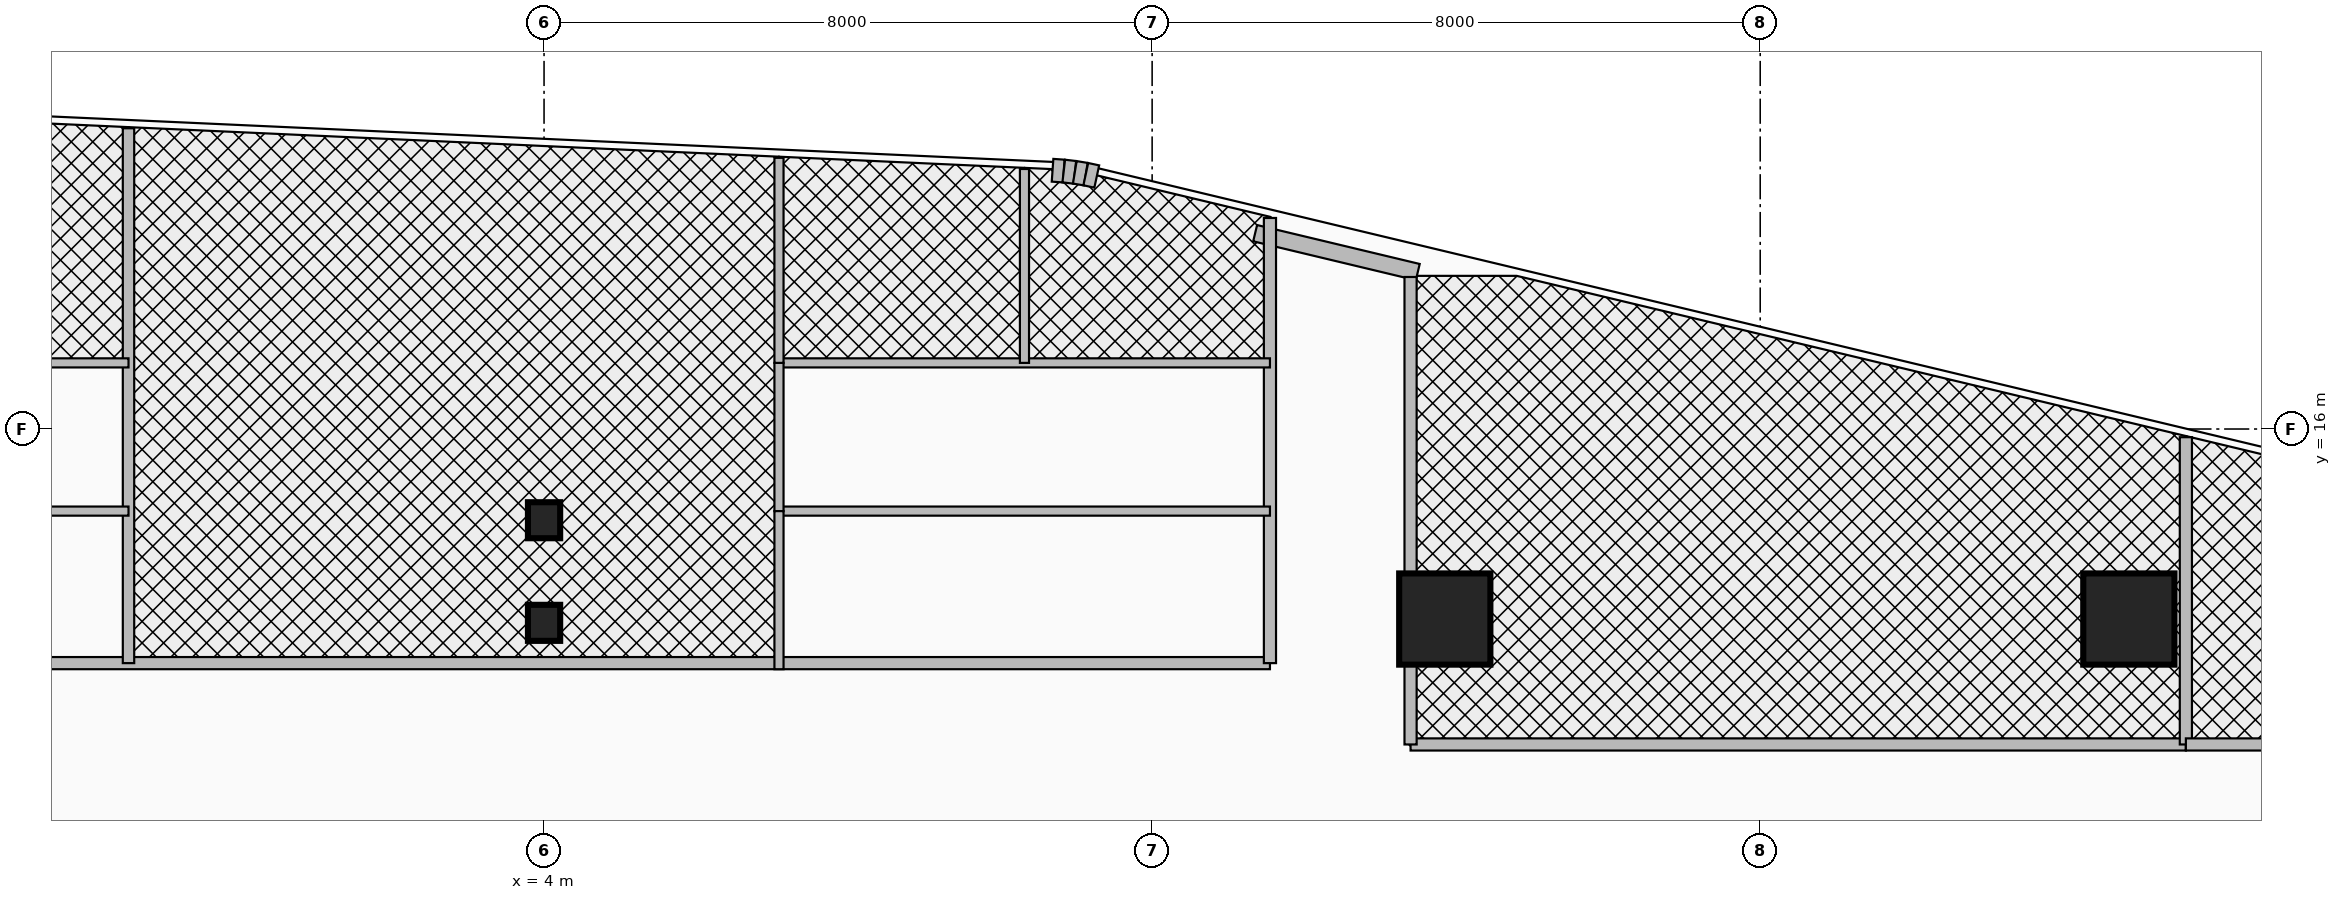
"""IFC4 building model, lengths in metres.
Left out: names, types, materials, properties, quantities, classifications, styles, units other than length and angle.
Written with IfcOpenShell. Run it as: python <this file> out.ifc"""

import sys

from ifc_helpers import new_model, si_unit, direction, frame, frame_2d, origin, origin_2d, place, context, subcontext, project, spatial, rectangle, i_section, extrude, source, transform, mapped, element, fill, save


model = new_model("IFC4")
c1 = context("Model", 3, precision=1e-05, world=origin(), true_north=direction((0.0, 1.0)))
c2 = subcontext(c1, "Body", "Model", "MODEL_VIEW")
j1 = project(units=[si_unit("LENGTHUNIT", "METRE"), si_unit("PLANEANGLEUNIT", "RADIAN")], contexts=[c1])
p1 = place(None, origin())
s1 = spatial("IfcSite", under=j1, at=p1, CompositionType="ELEMENT")
p2 = place(p1, origin())
s2 = spatial("IfcBuilding", under=s1, at=p2, CompositionType="ELEMENT")
p3 = place(p2, frame((0.0, 0.0, 109.4)))
s3 = spatial("IfcBuildingStorey", under=s2, at=p3, CompositionType="ELEMENT", Elevation=109.4)
m1 = source(origin(), c2, "Body", "SweptSolid", [
    extrude(rectangle(XDim=1.2, YDim=1.2, at=origin_2d()), origin(), (0.0, 0.0, 1.0), 3.7),
])
for number, where, z_axis, x_axis in (
    (1, (15.85, 13.5, 0.0), (0.0, 0.0, 1.0), (1.0, 0.0, 0.0)),
    (2, (24.85, 13.5, 0.0), (0.0, 0.0, 1.0), (1.0, 0.0, 0.0)),
):
    element("IfcColumn", number, at=place(p3, frame(where, z_axis=z_axis, x_axis=x_axis)), inside=s3, PredefinedType="COLUMN", context=c2, shape_type="MappedRepresentation", body=[
        mapped(m1, transform((0.0, 0.0, 0.0), x_axis=(1.0, 0.0, 0.0), y_axis=(0.0, 1.0, 0.0), z_axis=(0.0, 0.0, 1.0), scale=1.0)),
    ])
m2 = source(origin(), c2, "Body", "SweptSolid", [
    extrude(i_section(OverallWidth=0.424, OverallDepth=0.474, WebThickness=0.048, FlangeThickness=0.077, at=origin_2d()), origin(), (0.0, 0.0, 1.0), 3.7),
])
for number, where, z_axis, x_axis in (
    (3, (4.0, 13.45, 0.0), (0.0, 0.0, 1.0), (1.0, 0.0, 0.0)),
    (4, (4.0, 14.8, 0.0), (0.0, 0.0, 1.0), (1.0, 0.0, 0.0)),
):
    element("IfcColumn", number, at=place(p3, frame(where, z_axis=z_axis, x_axis=x_axis)), inside=s3, PredefinedType="COLUMN", context=c2, shape_type="MappedRepresentation", body=[
        mapped(m2, transform((0.0, 0.0, 0.0), x_axis=(1.0, 0.0, 0.0), y_axis=(0.0, 1.0, 0.0), z_axis=(0.0, 0.0, 1.0), scale=1.0)),
    ])
p4 = place(p3, frame((10.69, 19.404, 0.0), z_axis=(0.0, 0.0, 1.0), x_axis=(0.99758310784, -0.069483400546, 0.0)))
e5 = element("IfcWall", 5, at=p4, inside=s3, PredefinedType="SOLIDWALL", context=c2, shape_type="SweptSolid", body=[
    extrude(rectangle(XDim=0.147, YDim=0.3, at=frame_2d((0.074, 0.0))), origin(), (0.0, 0.0, 1.0), 3.46),
])
for number, where, z_axis, x_axis in (
    (6, (10.837, 19.394, 0.0), (0.0, 0.0, 1.0), (0.993, -0.117, 0.0)),
    (7, (10.983, 19.377, 0.0), (0.0, 0.0, 1.0), (0.987, -0.163, 0.0)),
):
    element("IfcWall", number, at=place(p3, frame(where, z_axis=z_axis, x_axis=x_axis)), inside=s3, PredefinedType="SOLIDWALL", context=c2, shape_type="SweptSolid", body=[
        extrude(rectangle(XDim=0.146, YDim=0.3, at=frame_2d((0.073, 0.0))), origin(), (0.0, 0.0, 1.0), 3.46),
    ])
p5 = place(p3, frame((11.127, 19.353, 0.0), z_axis=(0.0, 0.0, 1.0), x_axis=(0.978019841688, -0.208511844421, 0.0)))
e8 = element("IfcWall", 8, at=p5, inside=s3, PredefinedType="SOLIDWALL", context=c2, shape_type="SweptSolid", body=[
    extrude(rectangle(XDim=0.147, YDim=0.3, at=frame_2d((0.074, 0.0))), origin(), (0.0, 0.0, 1.0), 3.46),
])
p6 = place(p3, frame((13.355, 18.576, 0.0), z_axis=(0.0, 0.0, 1.0), x_axis=(0.97252211384, -0.232810519721, 0.0)))
e9 = element("IfcWall", 9, at=p6, inside=s3, PredefinedType="SOLIDWALL", context=c2, shape_type="SweptSolid", body=[
    extrude(rectangle(XDim=2.2, YDim=0.22, at=frame_2d((1.1, 0.0))), origin(), (0.0, 0.0, 1.0), 3.46),
])
p7 = place(p6, frame((0.65, 0.0, 0.95)))
e10 = element("IfcOpeningElement", 10, at=p7, cuts=e9, PredefinedType="OPENING", context=c2, shape_type="SweptSolid", body=[
    extrude(rectangle(XDim=0.9, YDim=1.3, at=frame_2d((0.45, 0.65))), frame((0.0, 0.125, 0.0), z_axis=(0.0, -1.0, 0.0), x_axis=(1.0, 0.0, 0.0)), (0.0, 0.0, 1.0), 0.25),
])
p8 = place(p3, frame((-28.25, 12.92, 0.0), z_axis=(0.0, 0.0, 1.0), x_axis=(1.0, 0.0, 0.0)))
e11 = element("IfcWall", 11, at=p8, inside=s3, PredefinedType="PARTITIONING", context=c2, shape_type="SweptSolid", body=[
    extrude(rectangle(XDim=41.8, YDim=0.16, at=frame_2d((20.9, 0.0))), origin(), (0.0, 0.0, 1.0), 2.666),
])
p9 = place(p8, frame((1.456, 0.0, 0.0)))
e12 = element("IfcOpeningElement", 12, at=p9, cuts=e11, PredefinedType="OPENING", context=c2, shape_type="SweptSolid", body=[
    extrude(rectangle(XDim=0.95, YDim=2.15, at=frame_2d((0.475, 1.075))), frame((0.0, 0.095, 0.0), z_axis=(0.0, -1.0, 0.0), x_axis=(1.0, 0.0, 0.0)), (0.0, 0.0, 1.0), 0.19),
])
p10 = place(p8, frame((14.167, 0.0, 0.0)))
e13 = element("IfcOpeningElement", 13, at=p10, cuts=e11, PredefinedType="OPENING", context=c2, shape_type="SweptSolid", body=[
    extrude(rectangle(XDim=0.95, YDim=2.15, at=frame_2d((0.475, 1.075))), frame((0.0, 0.095, 0.0), z_axis=(0.0, -1.0, 0.0), x_axis=(1.0, 0.0, 0.0)), (0.0, 0.0, 1.0), 0.19),
])
p11 = place(p8, frame((30.587, 0.0, 0.0)))
e14 = element("IfcOpeningElement", 14, at=p11, cuts=e11, PredefinedType="OPENING", context=c2, shape_type="SweptSolid", body=[
    extrude(rectangle(XDim=0.95, YDim=2.15, at=frame_2d((0.475, 1.075))), frame((0.0, 0.095, 0.0), z_axis=(0.0, -1.0, 0.0), x_axis=(1.0, 0.0, 0.0)), (0.0, 0.0, 1.0), 0.19),
])
p12 = place(p3, frame((13.55, 12.92, 0.0), z_axis=(0.0, 0.0, 1.0), x_axis=(0.0, 1.0, 0.0)))
e15 = element("IfcWall", 15, at=p12, inside=s3, PredefinedType="PARTITIONING", context=c2, shape_type="SweptSolid", body=[
    extrude(rectangle(XDim=5.857, YDim=0.16, at=frame_2d((2.928, 0.0))), origin(), (0.0, 0.0, 1.0), 2.666),
])
p13 = place(p3, frame((-1.467, 12.92, 0.0), z_axis=(0.0, 0.0, 1.0), x_axis=(0.0, 1.0, 0.0)))
e16 = element("IfcWall", 16, at=p13, inside=s3, PredefinedType="PARTITIONING", context=c2, shape_type="SweptSolid", body=[
    extrude(rectangle(XDim=7.037, YDim=0.15, at=frame_2d((3.518, 0.0))), origin(), (0.0, 0.0, 1.0), 2.666),
])
p14 = place(p3, frame((-9.576, 14.92, 0.0), z_axis=(0.0, 0.0, 1.0), x_axis=(1.0, 0.0, 0.0)))
e17 = element("IfcWall", 17, at=p14, inside=s3, PredefinedType="PARTITIONING", context=c2, shape_type="SweptSolid", body=[
    extrude(rectangle(XDim=8.109, YDim=0.12, at=frame_2d((4.054, 0.0))), origin(), (0.0, 0.0, 1.0), 2.666),
])
p15 = place(p3, frame((-9.576, 16.87, 0.0), z_axis=(0.0, 0.0, 1.0), x_axis=(1.0, 0.0, 0.0)))
e18 = element("IfcWall", 18, at=p15, inside=s3, PredefinedType="PARTITIONING", context=c2, shape_type="SweptSolid", body=[
    extrude(rectangle(XDim=8.109, YDim=0.12, at=frame_2d((4.054, 0.0))), origin(), (0.0, 0.0, 1.0), 3.46),
])
for number, where, z_axis, x_axis in (
    (19, (7.091, 14.92, 0.0), (0.0, 0.0, 1.0), (1.0, 0.0, 0.0)),
    (20, (7.091, 16.87, 0.0), (0.0, 0.0, 1.0), (1.0, 0.0, 0.0)),
):
    element("IfcWall", number, at=place(p3, frame(where, z_axis=z_axis, x_axis=x_axis)), inside=s3, PredefinedType="PARTITIONING", context=c2, shape_type="SweptSolid", body=[
        extrude(rectangle(XDim=6.459, YDim=0.12, at=frame_2d((3.229, 0.0))), origin(), (0.0, 0.0, 1.0), 3.46),
    ])
p16 = place(p3, frame((7.091, 14.92, 0.0), z_axis=(0.0, 0.0, 1.0), x_axis=(0.0, 1.0, 0.0)))
e21 = element("IfcWall", 21, at=p16, inside=s3, PredefinedType="PARTITIONING", context=c2, shape_type="SweptSolid", body=[
    extrude(rectangle(XDim=1.95, YDim=0.12, at=frame_2d((0.975, 0.0))), origin(), (0.0, 0.0, 1.0), 3.46),
])
p17 = place(p16, frame((0.55, 0.0, 0.0)))
e22 = element("IfcOpeningElement", 22, at=p17, cuts=e21, PredefinedType="OPENING", context=c2, shape_type="SweptSolid", body=[
    extrude(rectangle(XDim=0.85, YDim=2.1, at=frame_2d((0.425, 1.05))), frame((0.0, 0.075, 0.0), z_axis=(0.0, -1.0, 0.0), x_axis=(1.0, 0.0, 0.0)), (0.0, 0.0, 1.0), 0.15),
])
p18 = place(p3, frame((7.091, 12.84, 0.0), z_axis=(0.0, 0.0, 1.0), x_axis=(0.0, 1.0, 0.0)))
e23 = element("IfcWall", 23, at=p18, inside=s3, PredefinedType="PARTITIONING", context=c2, shape_type="SweptSolid", body=[
    extrude(rectangle(XDim=2.08, YDim=0.12, at=frame_2d((1.04, 0.0))), origin(), (0.0, 0.0, 1.0), 2.666),
])
p19 = place(p18, frame((0.55, 0.0, 0.0)))
e24 = element("IfcOpeningElement", 24, at=p19, cuts=e23, PredefinedType="OPENING", context=c2, shape_type="SweptSolid", body=[
    extrude(rectangle(XDim=0.9, YDim=2.1, at=frame_2d((0.45, 1.05))), frame((0.0, 0.075, 0.0), z_axis=(0.0, -1.0, 0.0), x_axis=(1.0, 0.0, 0.0)), (0.0, 0.0, 1.0), 0.15),
])
p20 = place(p3, frame((7.091, 16.87, 0.0), z_axis=(0.0, 0.0, 1.0), x_axis=(0.0, 1.0, 0.0)))
e25 = element("IfcWall", 25, at=p20, inside=s3, PredefinedType="PARTITIONING", context=c2, shape_type="SweptSolid", body=[
    extrude(rectangle(XDim=2.698, YDim=0.12, at=frame_2d((1.349, 0.0))), origin(), (0.0, 0.0, 1.0), 3.46),
])
p21 = place(p20, frame((0.899, 0.0, 0.0)))
e26 = element("IfcOpeningElement", 26, at=p21, cuts=e25, PredefinedType="OPENING", context=c2, shape_type="SweptSolid", body=[
    extrude(rectangle(XDim=0.9, YDim=2.1, at=frame_2d((0.45, 1.05))), frame((0.0, 0.075, 0.0), z_axis=(0.0, -1.0, 0.0), x_axis=(1.0, 0.0, 0.0)), (0.0, 0.0, 1.0), 0.15),
])
p22 = place(p3, frame((10.32, 16.87, 0.0), z_axis=(0.0, 0.0, 1.0), x_axis=(0.0, 1.0, 0.0)))
e27 = element("IfcWall", 27, at=p22, inside=s3, PredefinedType="PARTITIONING", context=c2, shape_type="SweptSolid", body=[
    extrude(rectangle(XDim=2.551, YDim=0.12, at=frame_2d((1.275, 0.0))), origin(), (0.0, 0.0, 1.0), 3.46),
])
p23 = place(p22, frame((0.9, 0.0, 0.0)))
e28 = element("IfcOpeningElement", 28, at=p23, cuts=e27, PredefinedType="OPENING", context=c2, shape_type="SweptSolid", body=[
    extrude(rectangle(XDim=0.9, YDim=2.1, at=frame_2d((0.45, 1.05))), frame((0.0, 0.075, 0.0), z_axis=(0.0, -1.0, 0.0), x_axis=(1.0, 0.0, 0.0)), (0.0, 0.0, 1.0), 0.15),
])
p24 = place(p3, frame((15.4, 11.85, 0.0), z_axis=(0.0, 0.0, 1.0), x_axis=(1.0, 0.0, 0.0)))
e29 = element("IfcWall", 29, at=p24, inside=s3, PredefinedType="PARTITIONING", context=c2, shape_type="SweptSolid", body=[
    extrude(rectangle(XDim=10.2, YDim=0.16, at=frame_2d((5.1, 0.0))), origin(), (0.0, 0.0, 1.0), 2.834),
])
p25 = place(p24, frame((4.65, 0.0, 0.0)))
e30 = element("IfcOpeningElement", 30, at=p25, cuts=e29, PredefinedType="OPENING", context=c2, shape_type="SweptSolid", body=[
    extrude(rectangle(XDim=0.9, YDim=2.1, at=frame_2d((0.45, 1.05))), frame((0.0, 0.095, 0.0), z_axis=(0.0, -1.0, 0.0), x_axis=(1.0, 0.0, 0.0)), (0.0, 0.0, 1.0), 0.19),
])
p26 = place(p3, frame((15.4, 11.85, 0.0), z_axis=(0.0, 0.0, 1.0), x_axis=(0.0, 1.0, 0.0)))
e31 = element("IfcWall", 31, at=p26, inside=s3, PredefinedType="PARTITIONING", context=c2, shape_type="SweptSolid", body=[
    extrude(rectangle(XDim=6.15, YDim=0.16, at=frame_2d((3.075, 0.0))), origin(), (0.0, 0.0, 1.0), 2.666),
])
p27 = place(p3, frame((25.6, 11.85, 0.0), z_axis=(0.0, 0.0, 1.0), x_axis=(0.0, 1.0, 0.0)))
e32 = element("IfcWall", 32, at=p27, inside=s3, PredefinedType="PARTITIONING", context=c2, shape_type="SweptSolid", body=[
    extrude(rectangle(XDim=4.042, YDim=0.16, at=frame_2d((2.021, 0.0))), origin(), (0.0, 0.0, 1.0), 2.666),
])
p28 = place(p3, frame((25.6, 11.85, 0.0), z_axis=(0.0, 0.0, 1.0), x_axis=(1.0, 0.0, 0.0)))
e33 = element("IfcWall", 33, at=p28, inside=s3, PredefinedType="PARTITIONING", context=c2, shape_type="SweptSolid", body=[
    extrude(rectangle(XDim=4.09, YDim=0.16, at=frame_2d((2.045, 0.0))), origin(), (0.0, 0.0, 1.0), 2.896),
])
p29 = place(p28, frame((0.3, 0.0, 0.0)))
e34 = element("IfcOpeningElement", 34, at=p29, cuts=e33, PredefinedType="OPENING", context=c2, shape_type="SweptSolid", body=[
    extrude(rectangle(XDim=0.9, YDim=2.1, at=frame_2d((0.45, 1.05))), frame((0.0, 0.095, 0.0), z_axis=(0.0, -1.0, 0.0), x_axis=(1.0, 0.0, 0.0)), (0.0, 0.0, 1.0), 0.19),
])
p30 = place(p7, origin())
e35 = element("IfcWindow", 35, at=p30, inside=s3, PartitioningType="SINGLE_PANEL", PredefinedType="WINDOW", context=c2, shape_type="SweptSolid", body=[
    extrude(rectangle(XDim=0.9, YDim=1.3, at=frame_2d((0.45, 0.65))), frame((0.0, 0.03, 0.0), z_axis=(0.0, -1.0, 0.0), x_axis=(1.0, 0.0, 0.0)), (0.0, 0.0, 1.0), 0.06),
])
fill(e10, e35)
p31 = place(p11, frame((0.95, 0.0, 0.0), z_axis=(0.0, 0.0, 1.0), x_axis=(-1.0, 0.0, 0.0)))
e36 = element("IfcDoor", 36, at=p31, inside=s3, OperationType="SINGLE_SWING_LEFT", PredefinedType="DOOR", context=c2, shape_type="SweptSolid", body=[
    extrude(rectangle(XDim=0.95, YDim=2.15, at=frame_2d((0.475, 1.075))), frame((0.0, 0.025, 0.0), z_axis=(0.0, -1.0, 0.0), x_axis=(1.0, 0.0, 0.0)), (0.0, 0.0, 1.0), 0.05),
])
fill(e14, e36)
p32 = place(p17, origin())
e37 = element("IfcDoor", 37, at=p32, inside=s3, OperationType="SINGLE_SWING_RIGHT", PredefinedType="DOOR", context=c2, shape_type="SweptSolid", body=[
    extrude(rectangle(XDim=0.85, YDim=2.1, at=frame_2d((0.425, 1.05))), frame((0.0, 0.025, 0.0), z_axis=(0.0, -1.0, 0.0), x_axis=(1.0, 0.0, 0.0)), (0.0, 0.0, 1.0), 0.05),
])
fill(e22, e37)
p33 = place(p19, origin())
e38 = element("IfcDoor", 38, at=p33, inside=s3, OperationType="SINGLE_SWING_LEFT", PredefinedType="DOOR", context=c2, shape_type="SweptSolid", body=[
    extrude(rectangle(XDim=0.9, YDim=2.1, at=frame_2d((0.45, 1.05))), frame((0.0, 0.025, 0.0), z_axis=(0.0, -1.0, 0.0), x_axis=(1.0, 0.0, 0.0)), (0.0, 0.0, 1.0), 0.05),
])
fill(e24, e38)
p34 = place(p21, origin())
e39 = element("IfcDoor", 39, at=p34, inside=s3, OperationType="SINGLE_SWING_RIGHT", PredefinedType="DOOR", context=c2, shape_type="SweptSolid", body=[
    extrude(rectangle(XDim=0.9, YDim=2.1, at=frame_2d((0.45, 1.05))), frame((0.0, 0.025, 0.0), z_axis=(0.0, -1.0, 0.0), x_axis=(1.0, 0.0, 0.0)), (0.0, 0.0, 1.0), 0.05),
])
fill(e26, e39)
p35 = place(p23, frame((0.9, 0.0, 0.0), z_axis=(0.0, 0.0, 1.0), x_axis=(-1.0, 0.0, 0.0)))
e40 = element("IfcDoor", 40, at=p35, inside=s3, OperationType="SINGLE_SWING_LEFT", PredefinedType="DOOR", context=c2, shape_type="SweptSolid", body=[
    extrude(rectangle(XDim=0.9, YDim=2.1, at=frame_2d((0.45, 1.05))), frame((0.0, 0.025, 0.0), z_axis=(0.0, -1.0, 0.0), x_axis=(1.0, 0.0, 0.0)), (0.0, 0.0, 1.0), 0.05),
])
fill(e28, e40)
p36 = place(p25, origin())
e41 = element("IfcDoor", 41, at=p36, inside=s3, OperationType="SINGLE_SWING_RIGHT", PredefinedType="DOOR", context=c2, shape_type="SweptSolid", body=[
    extrude(rectangle(XDim=0.9, YDim=2.1, at=frame_2d((0.45, 1.05))), frame((0.0, 0.025, 0.0), z_axis=(0.0, -1.0, 0.0), x_axis=(1.0, 0.0, 0.0)), (0.0, 0.0, 1.0), 0.05),
])
fill(e30, e41)
p37 = place(p29, origin())
e42 = element("IfcDoor", 42, at=p37, inside=s3, OperationType="SINGLE_SWING_RIGHT", PredefinedType="DOOR", context=c2, shape_type="SweptSolid", body=[
    extrude(rectangle(XDim=0.9, YDim=2.1, at=frame_2d((0.45, 1.05))), frame((0.0, 0.025, 0.0), z_axis=(0.0, -1.0, 0.0), x_axis=(1.0, 0.0, 0.0)), (0.0, 0.0, 1.0), 0.05),
])
fill(e34, e42)
save(model, sys.argv[1])
